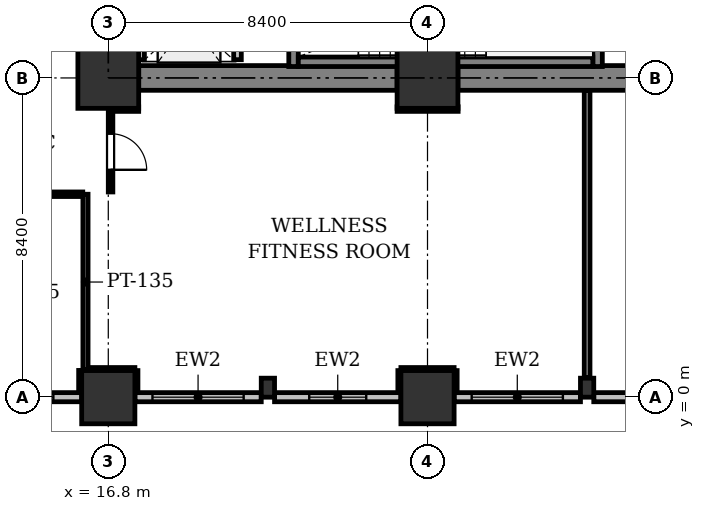
"""IFC4 building model, lengths in metres.
Left out: names, types, materials, properties, quantities, classifications, styles, units other than length and angle.
Written with IfcOpenShell. Run it as: python <this file> out.ifc"""

import sys

from ifc_helpers import new_model, si_unit, direction, frame, frame_2d, origin, origin_2d, place, context, subcontext, project, spatial, rectangle, extrude, element, fill, save


model = new_model("IFC4")
c1 = context("Model", 3, precision=1e-05, world=origin(), true_north=direction((0.0, 1.0)))
c2 = subcontext(c1, "Body", "Model", "MODEL_VIEW")
j1 = project(units=[si_unit("LENGTHUNIT", "METRE"), si_unit("PLANEANGLEUNIT", "RADIAN")], contexts=[c1])
p1 = place(None, origin())
s1 = spatial("IfcSite", under=j1, at=p1, CompositionType="ELEMENT")
p2 = place(p1, origin())
s2 = spatial("IfcBuilding", under=s1, at=p2, CompositionType="ELEMENT")
p3 = place(p2, frame((0.0, 0.0, 15.0)))
s3 = spatial("IfcBuildingStorey", under=s2, at=p3, CompositionType="ELEMENT", Elevation=15.0)
p4 = place(p3, frame((16.8, 0.0, 0.0), z_axis=(0.0, 0.0, 1.0), x_axis=(1.0, 0.0, 0.0)))
e1 = element("IfcColumn", 1, at=p4, inside=s3, PredefinedType="COLUMN", context=c2, shape_type="SweptSolid", body=[
    extrude(rectangle(XDim=1.4, YDim=1.4, at=origin_2d()), origin(), (0.0, 0.0, 1.0), 4.8),
])
p5 = place(p3, frame((16.8, 8.4, 0.0), z_axis=(0.0, 0.0, 1.0), x_axis=(1.0, 0.0, 0.0)))
e2 = element("IfcColumn", 2, at=p5, inside=s3, PredefinedType="COLUMN", context=c2, shape_type="SweptSolid", body=[
    extrude(rectangle(XDim=1.6, YDim=1.6, at=origin_2d()), origin(), (0.0, 0.0, 1.0), 4.8),
])
p6 = place(p3, frame((25.2, 0.0, 0.0), z_axis=(0.0, 0.0, 1.0), x_axis=(1.0, 0.0, 0.0)))
e3 = element("IfcColumn", 3, at=p6, inside=s3, PredefinedType="COLUMN", context=c2, shape_type="SweptSolid", body=[
    extrude(rectangle(XDim=1.4, YDim=1.4, at=origin_2d()), origin(), (0.0, 0.0, 1.0), 4.8),
])
p7 = place(p3, frame((25.2, 8.4, 0.0), z_axis=(0.0, 0.0, 1.0), x_axis=(1.0, 0.0, 0.0)))
e4 = element("IfcColumn", 4, at=p7, inside=s3, PredefinedType="COLUMN", context=c2, shape_type="SweptSolid", body=[
    extrude(rectangle(XDim=1.6, YDim=1.6, at=origin_2d()), origin(), (0.0, 0.0, 1.0), 4.8),
])
for number, where, z_axis, x_axis in (
    (5, (21.0, 0.25, 0.0), (0.0, 0.0, 1.0), (1.0, 0.0, 0.0)),
    (6, (29.4, 0.25, 0.0), (0.0, 0.0, 1.0), (1.0, 0.0, 0.0)),
):
    element("IfcColumn", number, at=place(p3, frame(where, z_axis=z_axis, x_axis=x_axis)), inside=s3, PredefinedType="PILASTER", context=c2, shape_type="SweptSolid", body=[
        extrude(rectangle(XDim=0.35, YDim=0.5, at=origin_2d()), origin(), (0.0, 0.0, 1.0), 4.8),
    ])
p8 = place(p3, frame((32.9, 0.0, 0.0), z_axis=(0.0, 0.0, 1.0), x_axis=(-1.0, 0.0, 0.0)))
e7 = element("IfcWall", 7, at=p8, inside=s3, PredefinedType="STANDARD", context=c2, shape_type="SweptSolid", body=[
    extrude(rectangle(XDim=3.325, YDim=0.24, at=frame_2d((1.663, 0.0))), origin(), (0.0, 0.0, 1.0), 3.05),
])
p9 = place(p8, frame((0.913, 0.0, 0.9)))
e8 = element("IfcOpeningElement", 8, at=p9, cuts=e7, PredefinedType="OPENING", context=c2, shape_type="SweptSolid", body=[
    extrude(rectangle(XDim=1.5, YDim=1.6, at=frame_2d((0.75, 0.8))), frame((0.0, 0.13, 0.0), z_axis=(0.0, -1.0, 0.0), x_axis=(1.0, 0.0, 0.0)), (0.0, 0.0, 1.0), 0.26),
])
p10 = place(p3, frame((29.225, 0.0, 0.0), z_axis=(0.0, 0.0, 1.0), x_axis=(-1.0, 0.0, 0.0)))
e9 = element("IfcWall", 9, at=p10, inside=s3, PredefinedType="STANDARD", context=c2, shape_type="SweptSolid", body=[
    extrude(rectangle(XDim=3.325, YDim=0.24, at=frame_2d((1.663, 0.0))), origin(), (0.0, 0.0, 1.0), 3.05),
])
p11 = place(p10, frame((0.462, 0.0, 0.9)))
e10 = element("IfcOpeningElement", 10, at=p11, cuts=e9, PredefinedType="OPENING", context=c2, shape_type="SweptSolid", body=[
    extrude(rectangle(XDim=2.4, YDim=1.8, at=frame_2d((1.2, 0.9))), frame((0.0, 0.13, 0.0), z_axis=(0.0, -1.0, 0.0), x_axis=(1.0, 0.0, 0.0)), (0.0, 0.0, 1.0), 0.26),
])
p12 = place(p3, frame((24.5, 0.0, 0.0), z_axis=(0.0, 0.0, 1.0), x_axis=(-1.0, 0.0, 0.0)))
e11 = element("IfcWall", 11, at=p12, inside=s3, PredefinedType="STANDARD", context=c2, shape_type="SweptSolid", body=[
    extrude(rectangle(XDim=3.325, YDim=0.24, at=frame_2d((1.663, 0.0))), origin(), (0.0, 0.0, 1.0), 3.05),
])
p13 = place(p12, frame((0.913, 0.0, 0.9)))
e12 = element("IfcOpeningElement", 12, at=p13, cuts=e11, PredefinedType="OPENING", context=c2, shape_type="SweptSolid", body=[
    extrude(rectangle(XDim=1.5, YDim=1.6, at=frame_2d((0.75, 0.8))), frame((0.0, 0.13, 0.0), z_axis=(0.0, -1.0, 0.0), x_axis=(1.0, 0.0, 0.0)), (0.0, 0.0, 1.0), 0.26),
])
p14 = place(p3, frame((20.825, 0.0, 0.0), z_axis=(0.0, 0.0, 1.0), x_axis=(-1.0, 0.0, 0.0)))
e13 = element("IfcWall", 13, at=p14, inside=s3, PredefinedType="STANDARD", context=c2, shape_type="SweptSolid", body=[
    extrude(rectangle(XDim=3.325, YDim=0.24, at=frame_2d((1.663, 0.0))), origin(), (0.0, 0.0, 1.0), 3.05),
])
p15 = place(p14, frame((0.462, 0.0, 0.9)))
e14 = element("IfcOpeningElement", 14, at=p15, cuts=e13, PredefinedType="OPENING", context=c2, shape_type="SweptSolid", body=[
    extrude(rectangle(XDim=2.4, YDim=1.8, at=frame_2d((1.2, 0.9))), frame((0.0, 0.13, 0.0), z_axis=(0.0, -1.0, 0.0), x_axis=(1.0, 0.0, 0.0)), (0.0, 0.0, 1.0), 0.26),
])
p16 = place(p3, frame((16.1, 0.0, 0.0), z_axis=(0.0, 0.0, 1.0), x_axis=(-1.0, 0.0, 0.0)))
e15 = element("IfcWall", 15, at=p16, inside=s3, PredefinedType="STANDARD", context=c2, shape_type="SweptSolid", body=[
    extrude(rectangle(XDim=3.325, YDim=0.24, at=frame_2d((1.663, 0.0))), origin(), (0.0, 0.0, 1.0), 3.05),
])
p17 = place(p16, frame((0.745, 0.0, 0.9)))
e16 = element("IfcOpeningElement", 16, at=p17, cuts=e15, PredefinedType="OPENING", context=c2, shape_type="SweptSolid", body=[
    extrude(rectangle(XDim=1.5, YDim=1.6, at=frame_2d((0.75, 0.8))), frame((0.0, 0.13, 0.0), z_axis=(0.0, -1.0, 0.0), x_axis=(1.0, 0.0, 0.0)), (0.0, 0.0, 1.0), 0.26),
])
p18 = place(p3, frame((17.6, 8.4, 0.0), z_axis=(0.0, 0.0, 1.0), x_axis=(1.0, 0.0, 0.0)))
e17 = element("IfcWall", 17, at=p18, inside=s3, PredefinedType="SHEAR", context=c2, shape_type="SweptSolid", body=[
    extrude(rectangle(XDim=6.8, YDim=0.65, at=frame_2d((3.4, 0.0))), origin(), (0.0, 0.0, 1.0), 4.45),
])
p19 = place(p3, frame((26.0, 8.4, 0.0), z_axis=(0.0, 0.0, 1.0), x_axis=(1.0, 0.0, 0.0)))
e18 = element("IfcWall", 18, at=p19, inside=s3, PredefinedType="SHEAR", context=c2, shape_type="SweptSolid", body=[
    extrude(rectangle(XDim=6.8, YDim=0.65, at=frame_2d((3.4, 0.0))), origin(), (0.0, 0.0, 1.0), 4.45),
])
for number, where, z_axis, x_axis in (
    (19, (21.675, 8.7, 0.0), (0.0, 0.0, 1.0), (0.0, 1.0, 0.0)),
    (20, (29.675, 8.7, 0.0), (0.0, 0.0, 1.0), (0.0, 1.0, 0.0)),
):
    element("IfcWall", number, at=place(p3, frame(where, z_axis=z_axis, x_axis=x_axis)), inside=s3, PredefinedType="SHEAR", context=c2, shape_type="SweptSolid", body=[
        extrude(rectangle(XDim=3.75, YDim=0.25, at=frame_2d((1.875, 0.0))), origin(), (0.0, 0.0, 1.0), 4.45),
    ])
p20 = place(p3, frame((21.8, 8.825, 0.0), z_axis=(0.0, 0.0, 1.0), x_axis=(1.0, 0.0, 0.0)))
e21 = element("IfcWall", 21, at=p20, inside=s3, PredefinedType="SHEAR", context=c2, shape_type="SweptSolid", body=[
    extrude(rectangle(XDim=7.75, YDim=0.25, at=frame_2d((3.875, 0.0))), origin(), (0.0, 0.0, 1.0), 4.45),
])
for number, where, z_axis, x_axis in (
    (22, (20.2, 8.88, 0.0), (0.0, 0.0, 1.0), (0.0, 1.0, 0.0)),
    (23, (17.65, 8.88, 0.0), (0.0, 0.0, 1.0), (0.0, 1.0, 0.0)),
):
    element("IfcWall", number, at=place(p3, frame(where, z_axis=z_axis, x_axis=x_axis)), inside=s3, PredefinedType="PARTITIONING", context=c2, shape_type="SweptSolid", body=[
        extrude(rectangle(XDim=2.1, YDim=0.2, at=frame_2d((1.05, 0.0))), origin(), (0.0, 0.0, 1.0), 4.45),
    ])
p21 = place(p3, frame((16.08, 0.124, 0.0), z_axis=(0.0, 0.0, 1.0), x_axis=(0.000421052594, 0.999999911357, 0.0)))
e24 = element("IfcWall", 24, at=p21, inside=s3, PredefinedType="PARTITIONING", context=c2, shape_type="SweptSolid", body=[
    extrude(rectangle(XDim=0.58, YDim=0.12, at=frame_2d((0.29, 0.0))), origin(), (0.0, 0.0, 1.0), 3.05),
])
p22 = place(p3, frame((16.2, 0.72, 0.0), z_axis=(0.0, 0.0, 1.0), x_axis=(0.0, 1.0, 0.0)))
e25 = element("IfcWall", 25, at=p22, inside=s3, PredefinedType="PARTITIONING", context=c2, shape_type="SweptSolid", body=[
    extrude(rectangle(XDim=4.62, YDim=0.135, at=frame_2d((2.31, 0.0))), origin(), (0.0, 0.0, 1.0), 4.45),
])
p23 = place(p3, frame((16.128, 5.34, 0.0), z_axis=(0.0, 0.0, 1.0), x_axis=(-1.0, 0.0, 0.0)))
e26 = element("IfcWall", 26, at=p23, inside=s3, PredefinedType="PARTITIONING", context=c2, shape_type="SweptSolid", body=[
    extrude(rectangle(XDim=2.857, YDim=0.12, at=frame_2d((1.428, 0.0))), origin(), (0.0, 0.0, 1.0), 4.45),
])
p24 = place(p23, frame((0.969, 0.0, 0.0)))
e27 = element("IfcOpeningElement", 27, at=p24, cuts=e26, PredefinedType="OPENING", context=c2, shape_type="SweptSolid", body=[
    extrude(rectangle(XDim=0.92, YDim=2.1, at=frame_2d((0.46, 1.05))), frame((0.0, 0.07, 0.0), z_axis=(0.0, -1.0, 0.0), x_axis=(1.0, 0.0, 0.0)), (0.0, 0.0, 1.0), 0.14),
])
p25 = place(p3, frame((16.32, 0.72, 0.0), z_axis=(0.0, 0.0, 1.0), x_axis=(1.0, 0.0, 0.0)))
e28 = element("IfcWall", 28, at=p25, inside=s3, PredefinedType="PARTITIONING", context=c2, shape_type="SweptSolid", body=[
    extrude(rectangle(XDim=1.18, YDim=0.12, at=frame_2d((0.59, 0.0))), origin(), (0.0, 0.0, 1.0), 3.25),
])
for number, where, z_axis, x_axis in (
    (29, (17.52, 0.7, 0.0), (0.0, 0.0, 1.0), (0.0, -1.0, 0.0)),
    (30, (24.48, 0.124, 0.0), (0.0, 0.0, 1.0), (0.0, 1.0, 0.0)),
):
    element("IfcWall", number, at=place(p3, frame(where, z_axis=z_axis, x_axis=x_axis)), inside=s3, PredefinedType="PARTITIONING", context=c2, shape_type="SweptSolid", body=[
        extrude(rectangle(XDim=0.576, YDim=0.12, at=frame_2d((0.288, 0.0))), origin(), (0.0, 0.0, 1.0), 3.05),
    ])
p26 = place(p3, frame((24.5, 0.72, 0.0), z_axis=(0.0, 0.0, 1.0), x_axis=(1.0, 0.0, 0.0)))
e31 = element("IfcWall", 31, at=p26, inside=s3, PredefinedType="PARTITIONING", context=c2, shape_type="SweptSolid", body=[
    extrude(rectangle(XDim=1.4, YDim=0.12, at=frame_2d((0.7, 0.0))), origin(), (0.0, 0.0, 1.0), 3.25),
])
p27 = place(p3, frame((25.92, 0.7, 0.0), z_axis=(0.0, 0.0, 1.0), x_axis=(0.0, -1.0, 0.0)))
e32 = element("IfcWall", 32, at=p27, inside=s3, PredefinedType="PARTITIONING", context=c2, shape_type="SweptSolid", body=[
    extrude(rectangle(XDim=0.576, YDim=0.12, at=frame_2d((0.288, 0.0))), origin(), (0.0, 0.0, 1.0), 3.05),
])
p28 = place(p3, frame((29.4, 0.52, 0.0), z_axis=(0.0, 0.0, 1.0), x_axis=(0.0, 1.0, 0.0)))
e33 = element("IfcWall", 33, at=p28, inside=s3, PredefinedType="PARTITIONING", context=c2, shape_type="SweptSolid", body=[
    extrude(rectangle(XDim=7.551, YDim=0.15, at=frame_2d((3.775, 0.0))), origin(), (0.0, 0.0, 1.0), 4.044),
])
p29 = place(p3, frame((26.006, 7.581, 0.0), z_axis=(0.0, 0.0, 1.0), x_axis=(-0.999999896002, -0.000456065626, 0.0)))
e34 = element("IfcWall", 34, at=p29, inside=s3, PredefinedType="PARTITIONING", context=c2, shape_type="SweptSolid", body=[
    extrude(rectangle(XDim=1.606, YDim=0.12, at=frame_2d((0.803, 0.0))), origin(), (0.0, 0.0, 1.0), 3.25),
])
p30 = place(p3, frame((17.6, 7.58, 0.0), z_axis=(0.0, 0.0, 1.0), x_axis=(-1.0, 0.0, 0.0)))
e35 = element("IfcWall", 35, at=p30, inside=s3, PredefinedType="PARTITIONING", context=c2, shape_type="SweptSolid", body=[
    extrude(rectangle(XDim=0.74, YDim=0.12, at=frame_2d((0.37, 0.0))), origin(), (0.0, 0.0, 1.0), 3.25),
])
p31 = place(p3, frame((16.86, 7.516, 0.0), z_axis=(0.0, 0.0, 1.0), x_axis=(0.0, -1.0, 0.0)))
e36 = element("IfcWall", 36, at=p31, inside=s3, PredefinedType="PARTITIONING", context=c2, shape_type="SweptSolid", body=[
    extrude(rectangle(XDim=2.116, YDim=0.12, at=frame_2d((1.058, 0.0))), origin(), (0.0, 0.0, 1.0), 3.25),
])
p32 = place(p31, frame((0.583, 0.0, 0.0)))
e37 = element("IfcOpeningElement", 37, at=p32, cuts=e36, PredefinedType="OPENING", context=c2, shape_type="SweptSolid", body=[
    extrude(rectangle(XDim=0.95, YDim=2.15, at=frame_2d((0.475, 1.075))), frame((0.0, 0.07, 0.0), z_axis=(0.0, -1.0, 0.0), x_axis=(1.0, 0.0, 0.0)), (0.0, 0.0, 1.0), 0.14),
])
p33 = place(p11, origin())
e38 = element("IfcWindow", 38, at=p33, inside=s3, PartitioningType="SINGLE_PANEL", PredefinedType="WINDOW", context=c2, shape_type="SweptSolid", body=[
    extrude(rectangle(XDim=2.4, YDim=1.8, at=frame_2d((1.2, 0.9))), frame((0.0, 0.03, 0.0), z_axis=(0.0, -1.0, 0.0), x_axis=(1.0, 0.0, 0.0)), (0.0, 0.0, 1.0), 0.06),
])
fill(e10, e38)
p34 = place(p13, origin())
e39 = element("IfcWindow", 39, at=p34, inside=s3, PartitioningType="SINGLE_PANEL", PredefinedType="WINDOW", context=c2, shape_type="SweptSolid", body=[
    extrude(rectangle(XDim=1.5, YDim=1.6, at=frame_2d((0.75, 0.8))), frame((0.0, 0.03, 0.0), z_axis=(0.0, -1.0, 0.0), x_axis=(1.0, 0.0, 0.0)), (0.0, 0.0, 1.0), 0.06),
])
fill(e12, e39)
p35 = place(p15, origin())
e40 = element("IfcWindow", 40, at=p35, inside=s3, PartitioningType="SINGLE_PANEL", PredefinedType="WINDOW", context=c2, shape_type="SweptSolid", body=[
    extrude(rectangle(XDim=2.4, YDim=1.8, at=frame_2d((1.2, 0.9))), frame((0.0, 0.03, 0.0), z_axis=(0.0, -1.0, 0.0), x_axis=(1.0, 0.0, 0.0)), (0.0, 0.0, 1.0), 0.06),
])
fill(e14, e40)
p36 = place(p17, origin())
e41 = element("IfcWindow", 41, at=p36, inside=s3, PartitioningType="SINGLE_PANEL", PredefinedType="WINDOW", context=c2, shape_type="SweptSolid", body=[
    extrude(rectangle(XDim=1.5, YDim=1.6, at=frame_2d((0.75, 0.8))), frame((0.0, 0.03, 0.0), z_axis=(0.0, -1.0, 0.0), x_axis=(1.0, 0.0, 0.0)), (0.0, 0.0, 1.0), 0.06),
])
fill(e16, e41)
p37 = place(p32, origin())
e42 = element("IfcDoor", 42, at=p37, inside=s3, OperationType="SINGLE_SWING_RIGHT", PredefinedType="DOOR", context=c2, shape_type="SweptSolid", body=[
    extrude(rectangle(XDim=0.95, YDim=2.15, at=frame_2d((0.475, 1.075))), frame((0.0, 0.025, 0.0), z_axis=(0.0, -1.0, 0.0), x_axis=(1.0, 0.0, 0.0)), (0.0, 0.0, 1.0), 0.05),
])
fill(e37, e42)
save(model, sys.argv[1])
